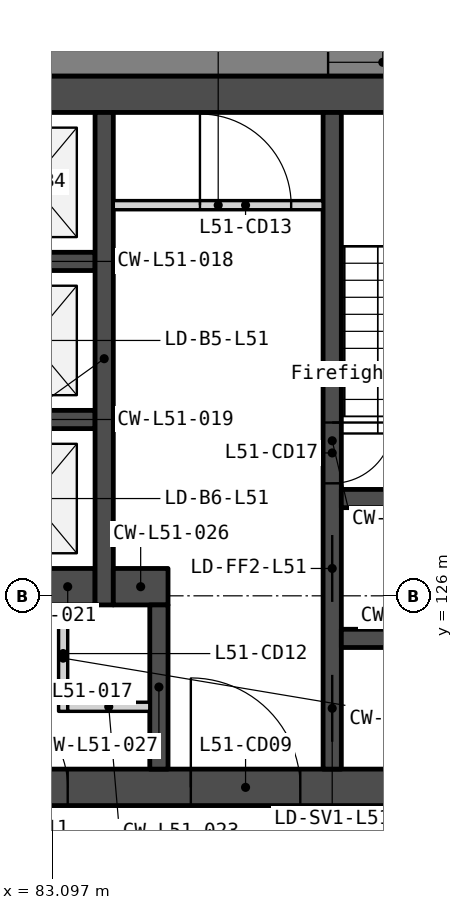
"""IFC4 building model, lengths in metres.
Left out: names, types, materials, properties, quantities, classifications, styles, units other than length and angle.
Written with IfcOpenShell. Run it as: python <this file> out.ifc"""

import sys

from ifc_helpers import new_model, si_unit, direction, frame, frame_2d, origin, place, context, subcontext, project, spatial, polyline, rectangle, outline, extrude, element, fill, save


model = new_model("IFC4")
c1 = context("Model", 3, precision=1e-05, world=origin(), true_north=direction((0.0, 1.0)))
c2 = subcontext(c1, "Body", "Model", "MODEL_VIEW")
j1 = project(units=[si_unit("LENGTHUNIT", "METRE"), si_unit("PLANEANGLEUNIT", "RADIAN")], contexts=[c1])
p1 = place(None, origin())
s1 = spatial("IfcSite", under=j1, at=p1, CompositionType="ELEMENT")
p2 = place(p1, origin())
s2 = spatial("IfcBuilding", under=s1, at=p2, CompositionType="ELEMENT")
p3 = place(p2, frame((0.0, 0.0, 203.6)))
s3 = spatial("IfcBuildingStorey", under=s2, at=p3, CompositionType="ELEMENT", Elevation=203.6)
p4 = place(p3, frame((69.0, 134.25, 0.0), z_axis=(0.0, 0.0, 1.0), x_axis=(1.0, 0.0, 0.0)))
e1 = element("IfcWall", 1, at=p4, inside=s3, PredefinedType="SOLIDWALL", context=c2, shape_type="SweptSolid", body=[
    extrude(rectangle(XDim=22.0, YDim=0.6, at=frame_2d((11.0, 0.0))), origin(), (0.0, 0.0, 1.0), 3.75),
])
p5 = place(p3, frame((69.0, 122.85, 0.0), z_axis=(0.0, 0.0, 1.0), x_axis=(1.0, 0.0, 0.0)))
e2 = element("IfcWall", 2, at=p5, inside=s3, PredefinedType="SOLIDWALL", context=c2, shape_type="SweptSolid", body=[
    extrude(rectangle(XDim=22.0, YDim=0.6, at=frame_2d((11.0, 0.0))), origin(), (0.0, 0.0, 1.0), 3.75),
])
p6 = place(p5, frame((16.375, 0.0, 0.0)))
e3 = element("IfcOpeningElement", 3, at=p6, cuts=e2, PredefinedType="OPENING", context=c2, shape_type="SweptSolid", body=[
    extrude(rectangle(XDim=1.8, YDim=2.1, at=frame_2d((0.9, 1.05))), frame((0.0, 0.31, 0.0), z_axis=(0.0, -1.0, 0.0), x_axis=(1.0, 0.0, 0.0)), (0.0, 0.0, 1.0), 0.62),
])
p7 = place(p5, frame((3.825, 0.0, 0.0)))
e4 = element("IfcOpeningElement", 4, at=p7, cuts=e2, PredefinedType="OPENING", context=c2, shape_type="SweptSolid", body=[
    extrude(rectangle(XDim=1.8, YDim=2.1, at=frame_2d((0.9, 1.05))), frame((0.0, 0.31, 0.0), z_axis=(0.0, -1.0, 0.0), x_axis=(1.0, 0.0, 0.0)), (0.0, 0.0, 1.0), 0.62),
])
p8 = place(p5, frame((12.85, 0.0, 0.0)))
e5 = element("IfcOpeningElement", 5, at=p8, cuts=e2, PredefinedType="OPENING", context=c2, shape_type="SweptSolid", body=[
    extrude(rectangle(XDim=1.5, YDim=2.1, at=frame_2d((0.75, 1.05))), frame((0.0, 0.31, 0.0), z_axis=(0.0, -1.0, 0.0), x_axis=(1.0, 0.0, 0.0)), (0.0, 0.0, 1.0), 0.62),
])
for number, where, z_axis, x_axis in (
    (6, (81.7, 131.5, 0.0), (0.0, 0.0, 1.0), (1.0, 0.0, 0.0)),
    (7, (81.7, 128.9, 0.0), (0.0, 0.0, 1.0), (1.0, 0.0, 0.0)),
):
    element("IfcWall", number, at=place(p3, frame(where, z_axis=z_axis, x_axis=x_axis)), inside=s3, PredefinedType="SOLIDWALL", context=c2, shape_type="SweptSolid", body=[
        extrude(rectangle(XDim=2.1, YDim=0.3, at=frame_2d((1.05, 0.0))), origin(), (0.0, 0.0, 1.0), 3.75),
    ])
p9 = place(p3, frame((82.9, 126.15, 0.0), z_axis=(0.0, 0.0, 1.0), x_axis=(1.0, 0.0, 0.0)))
e8 = element("IfcWall", 8, at=p9, inside=s3, PredefinedType="SOLIDWALL", context=c2, shape_type="SweptSolid", body=[
    extrude(rectangle(XDim=0.9, YDim=0.6, at=frame_2d((0.45, 0.0))), origin(), (0.0, 0.0, 1.0), 3.75),
])
p10 = place(p3, frame((83.275, 125.85, 0.0), z_axis=(0.0, 0.0, 1.0), x_axis=(0.0, -1.0, 0.0)))
e9 = element("IfcWall", 9, at=p10, inside=s3, PredefinedType="PARTITIONING", context=c2, shape_type="SweptSolid", body=[
    extrude(rectangle(XDim=1.75, YDim=0.15, at=frame_2d((0.875, 0.0))), origin(), (0.0, 0.0, 1.0), 3.75),
])
p11 = place(p10, frame((0.35, 0.0, 0.0)))
e10 = element("IfcOpeningElement", 10, at=p11, cuts=e9, PredefinedType="OPENING", context=c2, shape_type="SweptSolid", body=[
    extrude(rectangle(XDim=0.9, YDim=2.1, at=frame_2d((0.45, 1.05))), frame((0.0, 0.085, 0.0), z_axis=(0.0, -1.0, 0.0), x_axis=(1.0, 0.0, 0.0)), (0.0, 0.0, 1.0), 0.17),
])
p12 = place(p3, frame((83.35, 124.175, 0.0), z_axis=(0.0, 0.0, 1.0), x_axis=(1.0, 0.0, 0.0)))
e11 = element("IfcWall", 11, at=p12, inside=s3, PredefinedType="PARTITIONING", context=c2, shape_type="SweptSolid", body=[
    extrude(rectangle(XDim=1.35, YDim=0.15, at=frame_2d((0.675, 0.0))), origin(), (0.0, 0.0, 1.0), 3.75),
])
p13 = place(p3, frame((83.95, 133.95, 0.0), z_axis=(0.0, 0.0, 1.0), x_axis=(0.0, -1.0, 0.0)))
e12 = element("IfcWall", 12, at=p13, inside=s3, PredefinedType="SOLIDWALL", context=c2, shape_type="SweptSolid", body=[
    extrude(rectangle(XDim=8.1, YDim=0.3, at=frame_2d((4.05, 0.0))), origin(), (0.0, 0.0, 1.0), 3.75),
])
p14 = place(p3, frame((84.1, 132.425, 0.0), z_axis=(0.0, 0.0, 1.0), x_axis=(1.0, 0.0, 0.0)))
e13 = element("IfcWall", 13, at=p14, inside=s3, PredefinedType="PARTITIONING", context=c2, shape_type="SweptSolid", body=[
    extrude(rectangle(XDim=3.45, YDim=0.15, at=frame_2d((1.725, 0.0))), origin(), (0.0, 0.0, 1.0), 3.75),
])
p15 = place(p14, frame((1.425, 0.0, 0.0)))
e14 = element("IfcOpeningElement", 14, at=p15, cuts=e13, PredefinedType="OPENING", context=c2, shape_type="SweptSolid", body=[
    extrude(rectangle(XDim=1.5, YDim=2.1, at=frame_2d((0.75, 1.05))), frame((0.0, 0.085, 0.0), z_axis=(0.0, -1.0, 0.0), x_axis=(1.0, 0.0, 0.0)), (0.0, 0.0, 1.0), 0.17),
])
p16 = place(p3, frame((84.1, 126.15, 0.0), z_axis=(0.0, 0.0, 1.0), x_axis=(1.0, 0.0, 0.0)))
e15 = element("IfcWall", 15, at=p16, inside=s3, PredefinedType="SOLIDWALL", context=c2, shape_type="SweptSolid", body=[
    extrude(rectangle(XDim=0.9, YDim=0.6, at=frame_2d((0.45, 0.0))), origin(), (0.0, 0.0, 1.0), 3.75),
])
p17 = place(p3, frame((84.85, 125.85, 0.0), z_axis=(0.0, 0.0, 1.0), x_axis=(0.0, -1.0, 0.0)))
e16 = element("IfcWall", 16, at=p17, inside=s3, PredefinedType="SOLIDWALL", context=c2, shape_type="SweptSolid", body=[
    extrude(rectangle(XDim=2.7, YDim=0.3, at=frame_2d((1.35, 0.0))), origin(), (0.0, 0.0, 1.0), 3.75),
])
p18 = place(p3, frame((87.7, 133.95, 0.0), z_axis=(0.0, 0.0, 1.0), x_axis=(0.0, -1.0, 0.0)))
e17 = element("IfcWall", 17, at=p18, inside=s3, PredefinedType="SOLIDWALL", context=c2, shape_type="SweptSolid", body=[
    extrude(rectangle(XDim=10.8, YDim=0.3, at=frame_2d((5.4, 0.0))), origin(), (0.0, 0.0, 1.0), 3.75),
])
p19 = place(p18, frame((6.95, 0.0, 0.0)))
e18 = element("IfcOpeningElement", 18, at=p19, cuts=e17, PredefinedType="OPENING", context=c2, shape_type="SweptSolid", body=[
    extrude(rectangle(XDim=1.1, YDim=2.1, at=frame_2d((0.55, 1.05))), frame((0.0, 0.16, 0.0), z_axis=(0.0, -1.0, 0.0), x_axis=(1.0, 0.0, 0.0)), (0.0, 0.0, 1.0), 0.32),
])
p20 = place(p18, frame((5.1, 0.0, 0.0)))
e19 = element("IfcOpeningElement", 19, at=p20, cuts=e17, PredefinedType="OPENING", context=c2, shape_type="SweptSolid", body=[
    extrude(rectangle(XDim=1.0, YDim=2.1, at=frame_2d((0.5, 1.05))), frame((0.0, 0.16, 0.0), z_axis=(0.0, -1.0, 0.0), x_axis=(1.0, 0.0, 0.0)), (0.0, 0.0, 1.0), 0.32),
])
p21 = place(p18, frame((9.25, 0.0, 0.0)))
e20 = element("IfcOpeningElement", 20, at=p21, cuts=e17, PredefinedType="OPENING", context=c2, shape_type="SweptSolid", body=[
    extrude(rectangle(XDim=1.1, YDim=2.1, at=frame_2d((0.55, 1.05))), frame((0.0, 0.16, 0.0), z_axis=(0.0, -1.0, 0.0), x_axis=(1.0, 0.0, 0.0)), (0.0, 0.0, 1.0), 0.32),
])
for number, where, z_axis, x_axis in (
    (21, (87.85, 127.6, 0.0), (0.0, 0.0, 1.0), (1.0, 0.0, 0.0)),
    (22, (87.85, 125.3, 0.0), (0.0, 0.0, 1.0), (1.0, 0.0, 0.0)),
):
    element("IfcWall", number, at=place(p3, frame(where, z_axis=z_axis, x_axis=x_axis)), inside=s3, PredefinedType="SOLIDWALL", context=c2, shape_type="SweptSolid", body=[
        extrude(rectangle(XDim=2.55, YDim=0.3, at=frame_2d((1.275, 0.0))), origin(), (0.0, 0.0, 1.0), 3.75),
    ])
p22 = place(p3, frame((99.365, 134.775, -0.15), z_axis=(0.0, 0.0, 1.0), x_axis=(-1.0, 0.0, 0.0)))
e23 = element("IfcWall", 23, at=p22, inside=s3, PredefinedType="SOLIDWALL", context=c2, shape_type="SweptSolid", body=[
    extrude(outline(polyline([(38.729, 0.0), (38.729, 3.9), (0.0, 3.9), (0.0, 0.0), (38.729, 0.0)])), frame((0.0, 0.225, 0.0), z_axis=(0.0, -1.0, 0.0), x_axis=(1.0, 0.0, 0.0)), (0.0, 0.0, 1.0), 0.45),
])
p23 = place(p22, frame((0.807, 0.0, 0.95)))
e24 = element("IfcOpeningElement", 24, at=p23, cuts=e23, PredefinedType="OPENING", context=c2, shape_type="SweptSolid", body=[
    extrude(rectangle(XDim=1.2, YDim=2.2, at=frame_2d((0.6, 1.1))), frame((0.0, 0.235, 0.0), z_axis=(0.0, -1.0, 0.0), x_axis=(1.0, 0.0, 0.0)), (0.0, 0.0, 1.0), 0.47),
])
p24 = place(p22, frame((7.632, 0.0, 0.95)))
e25 = element("IfcOpeningElement", 25, at=p24, cuts=e23, PredefinedType="OPENING", context=c2, shape_type="SweptSolid", body=[
    extrude(rectangle(XDim=1.8, YDim=2.2, at=frame_2d((0.9, 1.1))), frame((0.0, 0.235, 0.0), z_axis=(0.0, -1.0, 0.0), x_axis=(1.0, 0.0, 0.0)), (0.0, 0.0, 1.0), 0.47),
])
p25 = place(p22, frame((9.932, 0.0, 0.95)))
e26 = element("IfcOpeningElement", 26, at=p25, cuts=e23, PredefinedType="OPENING", context=c2, shape_type="SweptSolid", body=[
    extrude(rectangle(XDim=1.8, YDim=2.2, at=frame_2d((0.9, 1.1))), frame((0.0, 0.235, 0.0), z_axis=(0.0, -1.0, 0.0), x_axis=(1.0, 0.0, 0.0)), (0.0, 0.0, 1.0), 0.47),
])
p26 = place(p22, frame((17.315, 0.0, 0.95)))
e27 = element("IfcOpeningElement", 27, at=p26, cuts=e23, PredefinedType="OPENING", context=c2, shape_type="SweptSolid", body=[
    extrude(rectangle(XDim=1.8, YDim=2.2, at=frame_2d((0.9, 1.1))), frame((0.0, 0.235, 0.0), z_axis=(0.0, -1.0, 0.0), x_axis=(1.0, 0.0, 0.0)), (0.0, 0.0, 1.0), 0.47),
])
p27 = place(p22, frame((19.615, 0.0, 0.95)))
e28 = element("IfcOpeningElement", 28, at=p27, cuts=e23, PredefinedType="OPENING", context=c2, shape_type="SweptSolid", body=[
    extrude(rectangle(XDim=1.8, YDim=2.2, at=frame_2d((0.9, 1.1))), frame((0.0, 0.235, 0.0), z_axis=(0.0, -1.0, 0.0), x_axis=(1.0, 0.0, 0.0)), (0.0, 0.0, 1.0), 0.47),
])
p28 = place(p22, frame((26.997, 0.0, 0.95)))
e29 = element("IfcOpeningElement", 29, at=p28, cuts=e23, PredefinedType="OPENING", context=c2, shape_type="SweptSolid", body=[
    extrude(rectangle(XDim=1.8, YDim=2.2, at=frame_2d((0.9, 1.1))), frame((0.0, 0.235, 0.0), z_axis=(0.0, -1.0, 0.0), x_axis=(1.0, 0.0, 0.0)), (0.0, 0.0, 1.0), 0.47),
])
p29 = place(p22, frame((29.297, 0.0, 0.95)))
e30 = element("IfcOpeningElement", 30, at=p29, cuts=e23, PredefinedType="OPENING", context=c2, shape_type="SweptSolid", body=[
    extrude(rectangle(XDim=1.8, YDim=2.2, at=frame_2d((0.9, 1.1))), frame((0.0, 0.235, 0.0), z_axis=(0.0, -1.0, 0.0), x_axis=(1.0, 0.0, 0.0)), (0.0, 0.0, 1.0), 0.47),
])
p30 = place(p22, frame((36.722, 0.0, 0.95)))
e31 = element("IfcOpeningElement", 31, at=p30, cuts=e23, PredefinedType="OPENING", context=c2, shape_type="SweptSolid", body=[
    extrude(rectangle(XDim=1.2, YDim=2.2, at=frame_2d((0.6, 1.1))), frame((0.0, 0.235, 0.0), z_axis=(0.0, -1.0, 0.0), x_axis=(1.0, 0.0, 0.0)), (0.0, 0.0, 1.0), 0.47),
])
p31 = place(p3, frame((81.505, 98.627, -0.15), z_axis=(0.0, 0.0, 1.0), x_axis=(0.500002199942, 0.866024133644, 0.0)))
e32 = element("IfcWall", 32, at=p31, inside=s3, PredefinedType="SOLIDWALL", context=c2, shape_type="SweptSolid", body=[
    extrude(outline(polyline([(38.729, 0.0), (38.729, 3.9), (0.0, 3.9), (0.0, 0.0), (38.729, 0.0)])), frame((0.0, 0.225, 0.0), z_axis=(0.0, -1.0, 0.0), x_axis=(1.0, 0.0, 0.0)), (0.0, 0.0, 1.0), 0.45),
])
p32 = place(p31, frame((0.807, 0.0, 0.95)))
e33 = element("IfcOpeningElement", 33, at=p32, cuts=e32, PredefinedType="OPENING", context=c2, shape_type="SweptSolid", body=[
    extrude(rectangle(XDim=1.2, YDim=2.2, at=frame_2d((0.6, 1.1))), frame((0.0, 0.235, 0.0), z_axis=(0.0, -1.0, 0.0), x_axis=(1.0, 0.0, 0.0)), (0.0, 0.0, 1.0), 0.47),
])
p33 = place(p31, frame((7.632, 0.0, 0.95)))
e34 = element("IfcOpeningElement", 34, at=p33, cuts=e32, PredefinedType="OPENING", context=c2, shape_type="SweptSolid", body=[
    extrude(rectangle(XDim=1.8, YDim=2.2, at=frame_2d((0.9, 1.1))), frame((0.0, 0.235, 0.0), z_axis=(0.0, -1.0, 0.0), x_axis=(1.0, 0.0, 0.0)), (0.0, 0.0, 1.0), 0.47),
])
p34 = place(p31, frame((9.932, 0.0, 0.95)))
e35 = element("IfcOpeningElement", 35, at=p34, cuts=e32, PredefinedType="OPENING", context=c2, shape_type="SweptSolid", body=[
    extrude(rectangle(XDim=1.8, YDim=2.2, at=frame_2d((0.9, 1.1))), frame((0.0, 0.235, 0.0), z_axis=(0.0, -1.0, 0.0), x_axis=(1.0, 0.0, 0.0)), (0.0, 0.0, 1.0), 0.47),
])
p35 = place(p31, frame((17.315, 0.0, 0.95)))
e36 = element("IfcOpeningElement", 36, at=p35, cuts=e32, PredefinedType="OPENING", context=c2, shape_type="SweptSolid", body=[
    extrude(rectangle(XDim=1.8, YDim=2.2, at=frame_2d((0.9, 1.1))), frame((0.0, 0.235, 0.0), z_axis=(0.0, -1.0, 0.0), x_axis=(1.0, 0.0, 0.0)), (0.0, 0.0, 1.0), 0.47),
])
p36 = place(p31, frame((19.615, 0.0, 0.95)))
e37 = element("IfcOpeningElement", 37, at=p36, cuts=e32, PredefinedType="OPENING", context=c2, shape_type="SweptSolid", body=[
    extrude(rectangle(XDim=1.8, YDim=2.2, at=frame_2d((0.9, 1.1))), frame((0.0, 0.235, 0.0), z_axis=(0.0, -1.0, 0.0), x_axis=(1.0, 0.0, 0.0)), (0.0, 0.0, 1.0), 0.47),
])
p37 = place(p31, frame((26.997, 0.0, 0.95)))
e38 = element("IfcOpeningElement", 38, at=p37, cuts=e32, PredefinedType="OPENING", context=c2, shape_type="SweptSolid", body=[
    extrude(rectangle(XDim=1.8, YDim=2.2, at=frame_2d((0.9, 1.1))), frame((0.0, 0.235, 0.0), z_axis=(0.0, -1.0, 0.0), x_axis=(1.0, 0.0, 0.0)), (0.0, 0.0, 1.0), 0.47),
])
p38 = place(p31, frame((29.297, 0.0, 0.95)))
e39 = element("IfcOpeningElement", 39, at=p38, cuts=e32, PredefinedType="OPENING", context=c2, shape_type="SweptSolid", body=[
    extrude(rectangle(XDim=1.8, YDim=2.2, at=frame_2d((0.9, 1.1))), frame((0.0, 0.235, 0.0), z_axis=(0.0, -1.0, 0.0), x_axis=(1.0, 0.0, 0.0)), (0.0, 0.0, 1.0), 0.47),
])
p39 = place(p31, frame((36.722, 0.0, 0.95)))
e40 = element("IfcOpeningElement", 40, at=p39, cuts=e32, PredefinedType="OPENING", context=c2, shape_type="SweptSolid", body=[
    extrude(rectangle(XDim=1.2, YDim=2.2, at=frame_2d((0.6, 1.1))), frame((0.0, 0.235, 0.0), z_axis=(0.0, -1.0, 0.0), x_axis=(1.0, 0.0, 0.0)), (0.0, 0.0, 1.0), 0.47),
])
p40 = place(p19, origin())
e41 = element("IfcDoor", 41, at=p40, inside=s3, OperationType="SLIDING_TO_LEFT", PredefinedType="DOOR", context=c2, shape_type="SweptSolid", body=[
    extrude(rectangle(XDim=1.1, YDim=2.1, at=frame_2d((0.55, 1.05))), frame((0.0, 0.025, 0.0), z_axis=(0.0, -1.0, 0.0), x_axis=(1.0, 0.0, 0.0)), (0.0, 0.0, 1.0), 0.05),
])
fill(e18, e41)
p41 = place(p6, origin())
e42 = element("IfcDoor", 42, at=p41, inside=s3, OperationType="DOUBLE_DOOR_DOUBLE_SWING", PredefinedType="DOOR", context=c2, shape_type="SweptSolid", body=[
    extrude(rectangle(XDim=1.8, YDim=2.1, at=frame_2d((0.9, 1.05))), frame((0.0, 0.025, 0.0), z_axis=(0.0, -1.0, 0.0), x_axis=(1.0, 0.0, 0.0)), (0.0, 0.0, 1.0), 0.05),
])
fill(e3, e42)
p42 = place(p8, origin())
e43 = element("IfcDoor", 43, at=p42, inside=s3, OperationType="DOUBLE_DOOR_DOUBLE_SWING", PredefinedType="DOOR", context=c2, shape_type="SweptSolid", body=[
    extrude(rectangle(XDim=1.5, YDim=2.1, at=frame_2d((0.75, 1.05))), frame((0.0, 0.025, 0.0), z_axis=(0.0, -1.0, 0.0), x_axis=(1.0, 0.0, 0.0)), (0.0, 0.0, 1.0), 0.05),
])
fill(e5, e43)
p43 = place(p11, origin())
e44 = element("IfcDoor", 44, at=p43, inside=s3, OperationType="SINGLE_SWING_RIGHT", PredefinedType="DOOR", context=c2, shape_type="SweptSolid", body=[
    extrude(rectangle(XDim=0.9, YDim=2.1, at=frame_2d((0.45, 1.05))), frame((0.0, 0.025, 0.0), z_axis=(0.0, -1.0, 0.0), x_axis=(1.0, 0.0, 0.0)), (0.0, 0.0, 1.0), 0.05),
])
fill(e10, e44)
p44 = place(p15, origin())
e45 = element("IfcDoor", 45, at=p44, inside=s3, OperationType="DOUBLE_DOOR_DOUBLE_SWING", PredefinedType="DOOR", context=c2, shape_type="SweptSolid", body=[
    extrude(rectangle(XDim=1.5, YDim=2.1, at=frame_2d((0.75, 1.05))), frame((0.0, 0.025, 0.0), z_axis=(0.0, -1.0, 0.0), x_axis=(1.0, 0.0, 0.0)), (0.0, 0.0, 1.0), 0.05),
])
fill(e14, e45)
p45 = place(p20, origin())
e46 = element("IfcDoor", 46, at=p45, inside=s3, OperationType="SINGLE_SWING_LEFT", PredefinedType="DOOR", context=c2, shape_type="SweptSolid", body=[
    extrude(rectangle(XDim=1.0, YDim=2.1, at=frame_2d((0.5, 1.05))), frame((0.0, 0.025, 0.0), z_axis=(0.0, -1.0, 0.0), x_axis=(1.0, 0.0, 0.0)), (0.0, 0.0, 1.0), 0.05),
])
fill(e19, e46)
p46 = place(p21, origin())
e47 = element("IfcDoor", 47, at=p46, inside=s3, OperationType="SLIDING_TO_LEFT", PredefinedType="DOOR", context=c2, shape_type="SweptSolid", body=[
    extrude(rectangle(XDim=1.1, YDim=2.1, at=frame_2d((0.55, 1.05))), frame((0.0, 0.025, 0.0), z_axis=(0.0, -1.0, 0.0), x_axis=(1.0, 0.0, 0.0)), (0.0, 0.0, 1.0), 0.05),
])
fill(e20, e47)
p47 = place(p25, origin())
e48 = element("IfcWindow", 48, at=p47, inside=s3, PartitioningType="SINGLE_PANEL", PredefinedType="WINDOW", context=c2, shape_type="SweptSolid", body=[
    extrude(rectangle(XDim=1.8, YDim=2.2, at=frame_2d((0.9, 1.1))), frame((0.0, 0.03, 0.0), z_axis=(0.0, -1.0, 0.0), x_axis=(1.0, 0.0, 0.0)), (0.0, 0.0, 1.0), 0.06),
])
fill(e26, e48)
save(model, sys.argv[1])
